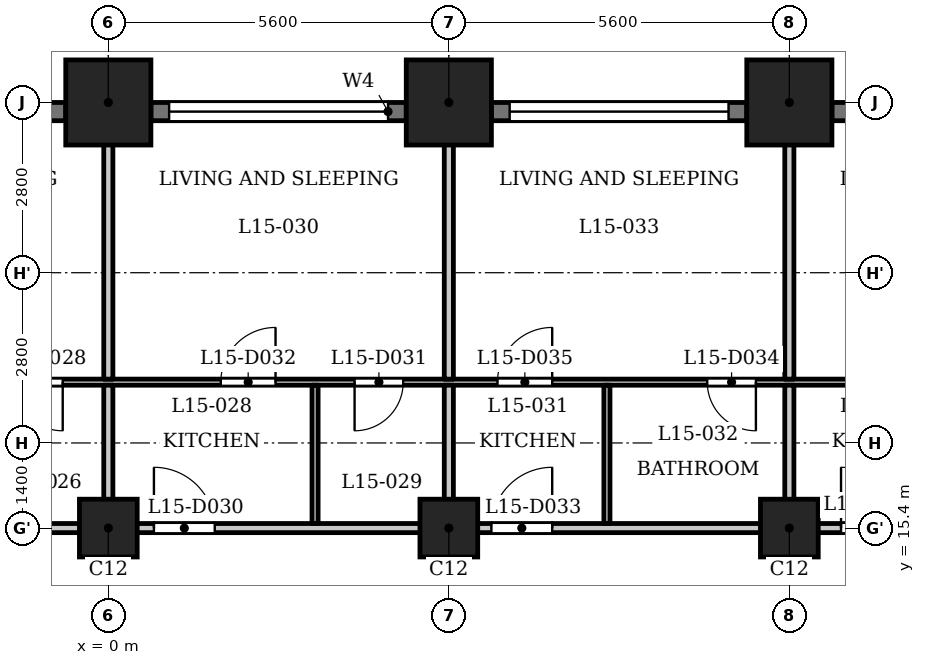
"""IFC4 building model, lengths in metres.
Left out: names, types, materials, properties, quantities, classifications, styles, units other than length and angle.
Written with IfcOpenShell. Run it as: python <this file> out.ifc"""

import sys

from ifc_helpers import new_model, si_unit, direction, frame, frame_2d, origin, origin_2d, place, context, subcontext, project, spatial, rectangle, extrude, element, fill, save


model = new_model("IFC4")
c1 = context("Model", 3, precision=1e-05, world=origin(), true_north=direction((0.0, 1.0)))
c2 = subcontext(c1, "Body", "Model", "MODEL_VIEW")
j1 = project(units=[si_unit("LENGTHUNIT", "METRE"), si_unit("PLANEANGLEUNIT", "RADIAN")], contexts=[c1])
p1 = place(None, origin())
s1 = spatial("IfcSite", under=j1, at=p1, CompositionType="ELEMENT")
p2 = place(p1, origin())
s2 = spatial("IfcBuilding", under=s1, at=p2, CompositionType="ELEMENT")
p3 = place(p2, frame((0.0, 0.0, 62.0)))
s3 = spatial("IfcBuildingStorey", under=s2, at=p3, CompositionType="ELEMENT", Elevation=62.0)
for number, where, z_axis, x_axis in (
    (1, (11.2, 22.4, 0.0), (0.0, 0.0, 1.0), (1.0, 0.0, 0.0)),
    (2, (5.6, 22.4, 0.0), (0.0, 0.0, 1.0), (1.0, 0.0, 0.0)),
    (3, (0.0, 22.4, 0.0), (0.0, 0.0, 1.0), (1.0, 0.0, 0.0)),
):
    element("IfcColumn", number, at=place(p3, frame(where, z_axis=z_axis, x_axis=x_axis)), inside=s3, PredefinedType="COLUMN", context=c2, shape_type="SweptSolid", body=[
        extrude(rectangle(XDim=1.4, YDim=1.4, at=origin_2d()), origin(), (0.0, 0.0, 1.0), 3.5),
    ])
for number, where, z_axis, x_axis in (
    (4, (0.0, 15.4, 0.0), (0.0, 0.0, 1.0), (1.0, 0.0, 0.0)),
    (5, (5.6, 15.4, 0.0), (0.0, 0.0, 1.0), (1.0, 0.0, 0.0)),
    (6, (11.2, 15.4, 0.0), (0.0, 0.0, 1.0), (1.0, 0.0, 0.0)),
):
    element("IfcColumn", number, at=place(p3, frame(where, z_axis=z_axis, x_axis=x_axis)), inside=s3, PredefinedType="COLUMN", context=c2, shape_type="SweptSolid", body=[
        extrude(rectangle(XDim=0.95, YDim=0.95, at=origin_2d()), origin(), (0.0, 0.0, 1.0), 3.5),
    ])
p4 = place(p3, frame((16.1, 22.25, 0.0), z_axis=(0.0, 0.0, 1.0), x_axis=(-1.0, 0.0, 0.0)))
e7 = element("IfcWall", 7, at=p4, inside=s3, PredefinedType="SOLIDWALL", context=c2, shape_type="SweptSolid", body=[
    extrude(rectangle(XDim=4.2, YDim=0.3, at=frame_2d((2.1, 0.0))), origin(), (0.0, 0.0, 1.0), 2.35),
])
p5 = place(p4, frame((0.3, 0.0, 1.2)))
e8 = element("IfcOpeningElement", 8, at=p5, cuts=e7, PredefinedType="OPENING", context=c2, shape_type="SweptSolid", body=[
    extrude(rectangle(XDim=3.6, YDim=0.95, at=frame_2d((1.8, 0.475))), frame((0.0, 0.16, 0.0), z_axis=(0.0, -1.0, 0.0), x_axis=(1.0, 0.0, 0.0)), (0.0, 0.0, 1.0), 0.32),
])
p6 = place(p3, frame((10.5, 22.25, 0.0), z_axis=(0.0, 0.0, 1.0), x_axis=(-1.0, 0.0, 0.0)))
e9 = element("IfcWall", 9, at=p6, inside=s3, PredefinedType="SOLIDWALL", context=c2, shape_type="SweptSolid", body=[
    extrude(rectangle(XDim=4.2, YDim=0.3, at=frame_2d((2.1, 0.0))), origin(), (0.0, 0.0, 1.0), 2.35),
])
p7 = place(p6, frame((0.3, 0.0, 1.2)))
e10 = element("IfcOpeningElement", 10, at=p7, cuts=e9, PredefinedType="OPENING", context=c2, shape_type="SweptSolid", body=[
    extrude(rectangle(XDim=3.6, YDim=0.95, at=frame_2d((1.8, 0.475))), frame((0.0, 0.16, 0.0), z_axis=(0.0, -1.0, 0.0), x_axis=(1.0, 0.0, 0.0)), (0.0, 0.0, 1.0), 0.32),
])
p8 = place(p3, frame((4.9, 22.25, 0.0), z_axis=(0.0, 0.0, 1.0), x_axis=(-1.0, 0.0, 0.0)))
e11 = element("IfcWall", 11, at=p8, inside=s3, PredefinedType="SOLIDWALL", context=c2, shape_type="SweptSolid", body=[
    extrude(rectangle(XDim=4.2, YDim=0.3, at=frame_2d((2.1, 0.0))), origin(), (0.0, 0.0, 1.0), 2.35),
])
p9 = place(p8, frame((0.3, 0.0, 1.2)))
e12 = element("IfcOpeningElement", 12, at=p9, cuts=e11, PredefinedType="OPENING", context=c2, shape_type="SweptSolid", body=[
    extrude(rectangle(XDim=3.6, YDim=0.95, at=frame_2d((1.8, 0.475))), frame((0.0, 0.16, 0.0), z_axis=(0.0, -1.0, 0.0), x_axis=(1.0, 0.0, 0.0)), (0.0, 0.0, 1.0), 0.32),
])
p10 = place(p3, frame((-0.7, 22.25, 0.0), z_axis=(0.0, 0.0, 1.0), x_axis=(-1.0, 0.0, 0.0)))
e13 = element("IfcWall", 13, at=p10, inside=s3, PredefinedType="SOLIDWALL", context=c2, shape_type="SweptSolid", body=[
    extrude(rectangle(XDim=4.2, YDim=0.3, at=frame_2d((2.1, 0.0))), origin(), (0.0, 0.0, 1.0), 2.35),
])
p11 = place(p10, frame((0.3, 0.0, 1.2)))
e14 = element("IfcOpeningElement", 14, at=p11, cuts=e13, PredefinedType="OPENING", context=c2, shape_type="SweptSolid", body=[
    extrude(rectangle(XDim=3.6, YDim=0.95, at=frame_2d((1.8, 0.475))), frame((0.0, 0.16, 0.0), z_axis=(0.0, -1.0, 0.0), x_axis=(1.0, 0.0, 0.0)), (0.0, 0.0, 1.0), 0.32),
])
p12 = place(p3, frame((-27.484, 15.4, 0.0), z_axis=(0.0, 0.0, 1.0), x_axis=(1.0, 0.0, 0.0)))
e15 = element("IfcWall", 15, at=p12, inside=s3, PredefinedType="PARTITIONING", context=c2, shape_type="SweptSolid", body=[
    extrude(rectangle(XDim=54.968, YDim=0.15, at=frame_2d((27.484, 0.0))), origin(), (0.0, 0.0, 1.0), 3.2),
])
p13 = place(p12, frame((8.784, 0.0, 0.0)))
e16 = element("IfcOpeningElement", 16, at=p13, cuts=e15, PredefinedType="OPENING", context=c2, shape_type="SweptSolid", body=[
    extrude(rectangle(XDim=1.0, YDim=2.1, at=frame_2d((0.5, 1.05))), frame((0.0, 0.085, 0.0), z_axis=(0.0, -1.0, 0.0), x_axis=(1.0, 0.0, 0.0)), (0.0, 0.0, 1.0), 0.17),
])
p14 = place(p12, frame((14.634, 0.0, 0.0)))
e17 = element("IfcOpeningElement", 17, at=p14, cuts=e15, PredefinedType="OPENING", context=c2, shape_type="SweptSolid", body=[
    extrude(rectangle(XDim=1.0, YDim=2.1, at=frame_2d((0.5, 1.05))), frame((0.0, 0.085, 0.0), z_axis=(0.0, -1.0, 0.0), x_axis=(1.0, 0.0, 0.0)), (0.0, 0.0, 1.0), 0.17),
])
p15 = place(p12, frame((19.484, 0.0, 0.0)))
e18 = element("IfcOpeningElement", 18, at=p15, cuts=e15, PredefinedType="OPENING", context=c2, shape_type="SweptSolid", body=[
    extrude(rectangle(XDim=1.0, YDim=2.1, at=frame_2d((0.5, 1.05))), frame((0.0, 0.085, 0.0), z_axis=(0.0, -1.0, 0.0), x_axis=(1.0, 0.0, 0.0)), (0.0, 0.0, 1.0), 0.17),
])
p16 = place(p12, frame((23.634, 0.0, 0.0)))
e19 = element("IfcOpeningElement", 19, at=p16, cuts=e15, PredefinedType="OPENING", context=c2, shape_type="SweptSolid", body=[
    extrude(rectangle(XDim=1.0, YDim=2.1, at=frame_2d((0.5, 1.05))), frame((0.0, 0.085, 0.0), z_axis=(0.0, -1.0, 0.0), x_axis=(1.0, 0.0, 0.0)), (0.0, 0.0, 1.0), 0.17),
])
p17 = place(p12, frame((28.234, 0.0, 0.0)))
e20 = element("IfcOpeningElement", 20, at=p17, cuts=e15, PredefinedType="OPENING", context=c2, shape_type="SweptSolid", body=[
    extrude(rectangle(XDim=1.0, YDim=2.1, at=frame_2d((0.5, 1.05))), frame((0.0, 0.085, 0.0), z_axis=(0.0, -1.0, 0.0), x_axis=(1.0, 0.0, 0.0)), (0.0, 0.0, 1.0), 0.17),
])
p18 = place(p12, frame((33.784, 0.0, 0.0)))
e21 = element("IfcOpeningElement", 21, at=p18, cuts=e15, PredefinedType="OPENING", context=c2, shape_type="SweptSolid", body=[
    extrude(rectangle(XDim=1.0, YDim=2.1, at=frame_2d((0.5, 1.05))), frame((0.0, 0.085, 0.0), z_axis=(0.0, -1.0, 0.0), x_axis=(1.0, 0.0, 0.0)), (0.0, 0.0, 1.0), 0.17),
])
p19 = place(p12, frame((39.534, 0.0, 0.0)))
e22 = element("IfcOpeningElement", 22, at=p19, cuts=e15, PredefinedType="OPENING", context=c2, shape_type="SweptSolid", body=[
    extrude(rectangle(XDim=1.0, YDim=2.1, at=frame_2d((0.5, 1.05))), frame((0.0, 0.085, 0.0), z_axis=(0.0, -1.0, 0.0), x_axis=(1.0, 0.0, 0.0)), (0.0, 0.0, 1.0), 0.17),
])
p20 = place(p12, frame((48.234, 0.0, 0.0)))
e23 = element("IfcOpeningElement", 23, at=p20, cuts=e15, PredefinedType="OPENING", context=c2, shape_type="SweptSolid", body=[
    extrude(rectangle(XDim=1.0, YDim=2.1, at=frame_2d((0.5, 1.05))), frame((0.0, 0.085, 0.0), z_axis=(0.0, -1.0, 0.0), x_axis=(1.0, 0.0, 0.0)), (0.0, 0.0, 1.0), 0.17),
])
p21 = place(p3, frame((-26.64, 17.8, 0.0), z_axis=(0.0, 0.0, 1.0), x_axis=(1.0, 0.0, 0.0)))
e24 = element("IfcWall", 24, at=p21, inside=s3, PredefinedType="PARTITIONING", context=c2, shape_type="SweptSolid", body=[
    extrude(rectangle(XDim=53.034, YDim=0.1, at=frame_2d((26.517, 0.0))), origin(), (0.0, 0.0, 1.0), 3.2),
])
p22 = place(p21, frame((2.872, 0.0, 0.0)))
e25 = element("IfcOpeningElement", 25, at=p22, cuts=e24, PredefinedType="OPENING", context=c2, shape_type="SweptSolid", body=[
    extrude(rectangle(XDim=0.8, YDim=2.1, at=frame_2d((0.4, 1.05))), frame((0.0, 0.06, 0.0), z_axis=(0.0, -1.0, 0.0), x_axis=(1.0, 0.0, 0.0)), (0.0, 0.0, 1.0), 0.12),
])
p23 = place(p21, frame((7.04, 0.0, 0.0)))
e26 = element("IfcOpeningElement", 26, at=p23, cuts=e24, PredefinedType="OPENING", context=c2, shape_type="SweptSolid", body=[
    extrude(rectangle(XDim=0.9, YDim=2.1, at=frame_2d((0.45, 1.05))), frame((0.0, 0.06, 0.0), z_axis=(0.0, -1.0, 0.0), x_axis=(1.0, 0.0, 0.0)), (0.0, 0.0, 1.0), 0.12),
])
p24 = place(p21, frame((10.74, 0.0, 0.0)))
e27 = element("IfcOpeningElement", 27, at=p24, cuts=e24, PredefinedType="OPENING", context=c2, shape_type="SweptSolid", body=[
    extrude(rectangle(XDim=0.8, YDim=2.1, at=frame_2d((0.4, 1.05))), frame((0.0, 0.06, 0.0), z_axis=(0.0, -1.0, 0.0), x_axis=(1.0, 0.0, 0.0)), (0.0, 0.0, 1.0), 0.12),
])
p25 = place(p21, frame((12.89, 0.0, 0.0)))
e28 = element("IfcOpeningElement", 28, at=p25, cuts=e24, PredefinedType="OPENING", context=c2, shape_type="SweptSolid", body=[
    extrude(rectangle(XDim=0.9, YDim=2.1, at=frame_2d((0.45, 1.05))), frame((0.0, 0.06, 0.0), z_axis=(0.0, -1.0, 0.0), x_axis=(1.0, 0.0, 0.0)), (0.0, 0.0, 1.0), 0.12),
])
p26 = place(p21, frame((16.34, 0.0, 0.0)))
e29 = element("IfcOpeningElement", 29, at=p26, cuts=e24, PredefinedType="OPENING", context=c2, shape_type="SweptSolid", body=[
    extrude(rectangle(XDim=0.8, YDim=2.1, at=frame_2d((0.4, 1.05))), frame((0.0, 0.06, 0.0), z_axis=(0.0, -1.0, 0.0), x_axis=(1.0, 0.0, 0.0)), (0.0, 0.0, 1.0), 0.12),
])
p27 = place(p21, frame((19.74, 0.0, 0.0)))
e30 = element("IfcOpeningElement", 30, at=p27, cuts=e24, PredefinedType="OPENING", context=c2, shape_type="SweptSolid", body=[
    extrude(rectangle(XDim=0.9, YDim=2.1, at=frame_2d((0.45, 1.05))), frame((0.0, 0.06, 0.0), z_axis=(0.0, -1.0, 0.0), x_axis=(1.0, 0.0, 0.0)), (0.0, 0.0, 1.0), 0.12),
])
p28 = place(p21, frame((25.09, 0.0, 0.0)))
e31 = element("IfcOpeningElement", 31, at=p28, cuts=e24, PredefinedType="OPENING", context=c2, shape_type="SweptSolid", body=[
    extrude(rectangle(XDim=0.8, YDim=2.1, at=frame_2d((0.4, 1.05))), frame((0.0, 0.06, 0.0), z_axis=(0.0, -1.0, 0.0), x_axis=(1.0, 0.0, 0.0)), (0.0, 0.0, 1.0), 0.12),
])
p29 = place(p21, frame((21.89, 0.0, 0.0)))
e32 = element("IfcOpeningElement", 32, at=p29, cuts=e24, PredefinedType="OPENING", context=c2, shape_type="SweptSolid", body=[
    extrude(rectangle(XDim=0.9, YDim=2.1, at=frame_2d((0.45, 1.05))), frame((0.0, 0.06, 0.0), z_axis=(0.0, -1.0, 0.0), x_axis=(1.0, 0.0, 0.0)), (0.0, 0.0, 1.0), 0.12),
])
p30 = place(p21, frame((30.69, 0.0, 0.0)))
e33 = element("IfcOpeningElement", 33, at=p30, cuts=e24, PredefinedType="OPENING", context=c2, shape_type="SweptSolid", body=[
    extrude(rectangle(XDim=0.8, YDim=2.1, at=frame_2d((0.4, 1.05))), frame((0.0, 0.06, 0.0), z_axis=(0.0, -1.0, 0.0), x_axis=(1.0, 0.0, 0.0)), (0.0, 0.0, 1.0), 0.12),
])
p31 = place(p21, frame((28.49, 0.0, 0.0)))
e34 = element("IfcOpeningElement", 34, at=p31, cuts=e24, PredefinedType="OPENING", context=c2, shape_type="SweptSolid", body=[
    extrude(rectangle(XDim=0.9, YDim=2.1, at=frame_2d((0.45, 1.05))), frame((0.0, 0.06, 0.0), z_axis=(0.0, -1.0, 0.0), x_axis=(1.0, 0.0, 0.0)), (0.0, 0.0, 1.0), 0.12),
])
p32 = place(p21, frame((36.49, 0.0, 0.0)))
e35 = element("IfcOpeningElement", 35, at=p32, cuts=e24, PredefinedType="OPENING", context=c2, shape_type="SweptSolid", body=[
    extrude(rectangle(XDim=0.8, YDim=2.1, at=frame_2d((0.4, 1.05))), frame((0.0, 0.06, 0.0), z_axis=(0.0, -1.0, 0.0), x_axis=(1.0, 0.0, 0.0)), (0.0, 0.0, 1.0), 0.12),
])
p33 = place(p21, frame((33.04, 0.0, 0.0)))
e36 = element("IfcOpeningElement", 36, at=p33, cuts=e24, PredefinedType="OPENING", context=c2, shape_type="SweptSolid", body=[
    extrude(rectangle(XDim=0.9, YDim=2.1, at=frame_2d((0.45, 1.05))), frame((0.0, 0.06, 0.0), z_axis=(0.0, -1.0, 0.0), x_axis=(1.0, 0.0, 0.0)), (0.0, 0.0, 1.0), 0.12),
])
p34 = place(p21, frame((41.49, 0.0, 0.0)))
e37 = element("IfcOpeningElement", 37, at=p34, cuts=e24, PredefinedType="OPENING", context=c2, shape_type="SweptSolid", body=[
    extrude(rectangle(XDim=0.8, YDim=2.1, at=frame_2d((0.4, 1.05))), frame((0.0, 0.06, 0.0), z_axis=(0.0, -1.0, 0.0), x_axis=(1.0, 0.0, 0.0)), (0.0, 0.0, 1.0), 0.12),
])
p35 = place(p21, frame((39.79, 0.0, 0.0)))
e38 = element("IfcOpeningElement", 38, at=p35, cuts=e24, PredefinedType="OPENING", context=c2, shape_type="SweptSolid", body=[
    extrude(rectangle(XDim=0.9, YDim=2.1, at=frame_2d((0.45, 1.05))), frame((0.0, 0.06, 0.0), z_axis=(0.0, -1.0, 0.0), x_axis=(1.0, 0.0, 0.0)), (0.0, 0.0, 1.0), 0.12),
])
p36 = place(p21, frame((51.44, 0.0, 0.0)))
e39 = element("IfcOpeningElement", 39, at=p36, cuts=e24, PredefinedType="OPENING", context=c2, shape_type="SweptSolid", body=[
    extrude(rectangle(XDim=0.8, YDim=2.1, at=frame_2d((0.4, 1.05))), frame((0.0, 0.06, 0.0), z_axis=(0.0, -1.0, 0.0), x_axis=(1.0, 0.0, 0.0)), (0.0, 0.0, 1.0), 0.12),
])
p37 = place(p21, frame((46.49, 0.0, 0.0)))
e40 = element("IfcOpeningElement", 40, at=p37, cuts=e24, PredefinedType="OPENING", context=c2, shape_type="SweptSolid", body=[
    extrude(rectangle(XDim=0.9, YDim=2.1, at=frame_2d((0.45, 1.05))), frame((0.0, 0.06, 0.0), z_axis=(0.0, -1.0, 0.0), x_axis=(1.0, 0.0, 0.0)), (0.0, 0.0, 1.0), 0.12),
])
p38 = place(p3, frame((0.0, 15.475, 0.0), z_axis=(0.0, 0.0, 1.0), x_axis=(0.0, 1.0, 0.0)))
e41 = element("IfcWall", 41, at=p38, inside=s3, PredefinedType="PARTITIONING", context=c2, shape_type="SweptSolid", body=[
    extrude(rectangle(XDim=2.275, YDim=0.15, at=frame_2d((1.137, 0.0))), origin(), (0.0, 0.0, 1.0), 3.2),
])
p39 = place(p3, frame((0.0, 17.85, 0.0), z_axis=(0.0, 0.0, 1.0), x_axis=(0.0, 1.0, 0.0)))
e42 = element("IfcWall", 42, at=p39, inside=s3, PredefinedType="PARTITIONING", context=c2, shape_type="SweptSolid", body=[
    extrude(rectangle(XDim=5.23, YDim=0.15, at=frame_2d((2.615, 0.0))), origin(), (0.0, 0.0, 1.0), 3.2),
])
p40 = place(p3, frame((3.4, 15.475, 0.0), z_axis=(0.0, 0.0, 1.0), x_axis=(0.0, 1.0, 0.0)))
e43 = element("IfcWall", 43, at=p40, inside=s3, PredefinedType="PARTITIONING", context=c2, shape_type="SweptSolid", body=[
    extrude(rectangle(XDim=2.275, YDim=0.1, at=frame_2d((1.137, 0.0))), origin(), (0.0, 0.0, 1.0), 3.2),
])
p41 = place(p3, frame((5.6, 15.475, 0.0), z_axis=(0.0, 0.0, 1.0), x_axis=(0.0, 1.0, 0.0)))
e44 = element("IfcWall", 44, at=p41, inside=s3, PredefinedType="PARTITIONING", context=c2, shape_type="SweptSolid", body=[
    extrude(rectangle(XDim=2.275, YDim=0.15, at=frame_2d((1.137, 0.0))), origin(), (0.0, 0.0, 1.0), 3.2),
])
p42 = place(p3, frame((5.6, 17.85, 0.0), z_axis=(0.0, 0.0, 1.0), x_axis=(0.0, 1.0, 0.0)))
e45 = element("IfcWall", 45, at=p42, inside=s3, PredefinedType="PARTITIONING", context=c2, shape_type="SweptSolid", body=[
    extrude(rectangle(XDim=5.23, YDim=0.15, at=frame_2d((2.615, 0.0))), origin(), (0.0, 0.0, 1.0), 3.2),
])
p43 = place(p3, frame((8.2, 15.475, 0.0), z_axis=(0.0, 0.0, 1.0), x_axis=(0.0, 1.0, 0.0)))
e46 = element("IfcWall", 46, at=p43, inside=s3, PredefinedType="PARTITIONING", context=c2, shape_type="SweptSolid", body=[
    extrude(rectangle(XDim=2.275, YDim=0.1, at=frame_2d((1.137, 0.0))), origin(), (0.0, 0.0, 1.0), 3.2),
])
p44 = place(p3, frame((11.2, 15.475, 0.0), z_axis=(0.0, 0.0, 1.0), x_axis=(0.0, 1.0, 0.0)))
e47 = element("IfcWall", 47, at=p44, inside=s3, PredefinedType="PARTITIONING", context=c2, shape_type="SweptSolid", body=[
    extrude(rectangle(XDim=2.275, YDim=0.15, at=frame_2d((1.137, 0.0))), origin(), (0.0, 0.0, 1.0), 3.2),
])
p45 = place(p3, frame((11.2, 17.85, 0.0), z_axis=(0.0, 0.0, 1.0), x_axis=(0.0, 1.0, 0.0)))
e48 = element("IfcWall", 48, at=p45, inside=s3, PredefinedType="PARTITIONING", context=c2, shape_type="SweptSolid", body=[
    extrude(rectangle(XDim=5.23, YDim=0.15, at=frame_2d((2.615, 0.0))), origin(), (0.0, 0.0, 1.0), 3.2),
])
p46 = place(p28, origin())
e49 = element("IfcDoor", 49, at=p46, inside=s3, OperationType="SINGLE_SWING_RIGHT", PredefinedType="DOOR", context=c2, shape_type="SweptSolid", body=[
    extrude(rectangle(XDim=0.8, YDim=2.1, at=frame_2d((0.4, 1.05))), frame((0.0, 0.025, 0.0), z_axis=(0.0, -1.0, 0.0), x_axis=(1.0, 0.0, 0.0)), (0.0, 0.0, 1.0), 0.05),
])
fill(e31, e49)
p47 = place(p17, origin())
e50 = element("IfcDoor", 50, at=p47, inside=s3, OperationType="SINGLE_SWING_RIGHT", PredefinedType="DOOR", context=c2, shape_type="SweptSolid", body=[
    extrude(rectangle(XDim=1.0, YDim=2.1, at=frame_2d((0.5, 1.05))), frame((0.0, 0.025, 0.0), z_axis=(0.0, -1.0, 0.0), x_axis=(1.0, 0.0, 0.0)), (0.0, 0.0, 1.0), 0.05),
])
fill(e20, e50)
p48 = place(p30, origin())
e51 = element("IfcDoor", 51, at=p48, inside=s3, OperationType="SINGLE_SWING_LEFT", PredefinedType="DOOR", context=c2, shape_type="SweptSolid", body=[
    extrude(rectangle(XDim=0.8, YDim=2.1, at=frame_2d((0.4, 1.05))), frame((0.0, 0.025, 0.0), z_axis=(0.0, -1.0, 0.0), x_axis=(1.0, 0.0, 0.0)), (0.0, 0.0, 1.0), 0.05),
])
fill(e33, e51)
p49 = place(p31, origin())
e52 = element("IfcDoor", 52, at=p49, inside=s3, OperationType="SINGLE_SWING_LEFT", PredefinedType="DOOR", context=c2, shape_type="SweptSolid", body=[
    extrude(rectangle(XDim=0.9, YDim=2.1, at=frame_2d((0.45, 1.05))), frame((0.0, 0.025, 0.0), z_axis=(0.0, -1.0, 0.0), x_axis=(1.0, 0.0, 0.0)), (0.0, 0.0, 1.0), 0.05),
])
fill(e34, e52)
p50 = place(p18, origin())
e53 = element("IfcDoor", 53, at=p50, inside=s3, OperationType="SINGLE_SWING_LEFT", PredefinedType="DOOR", context=c2, shape_type="SweptSolid", body=[
    extrude(rectangle(XDim=1.0, YDim=2.1, at=frame_2d((0.5, 1.05))), frame((0.0, 0.025, 0.0), z_axis=(0.0, -1.0, 0.0), x_axis=(1.0, 0.0, 0.0)), (0.0, 0.0, 1.0), 0.05),
])
fill(e21, e53)
p51 = place(p32, origin())
e54 = element("IfcDoor", 54, at=p51, inside=s3, OperationType="SINGLE_SWING_RIGHT", PredefinedType="DOOR", context=c2, shape_type="SweptSolid", body=[
    extrude(rectangle(XDim=0.8, YDim=2.1, at=frame_2d((0.4, 1.05))), frame((0.0, 0.025, 0.0), z_axis=(0.0, -1.0, 0.0), x_axis=(1.0, 0.0, 0.0)), (0.0, 0.0, 1.0), 0.05),
])
fill(e35, e54)
p52 = place(p33, origin())
e55 = element("IfcDoor", 55, at=p52, inside=s3, OperationType="SINGLE_SWING_LEFT", PredefinedType="DOOR", context=c2, shape_type="SweptSolid", body=[
    extrude(rectangle(XDim=0.9, YDim=2.1, at=frame_2d((0.45, 1.05))), frame((0.0, 0.025, 0.0), z_axis=(0.0, -1.0, 0.0), x_axis=(1.0, 0.0, 0.0)), (0.0, 0.0, 1.0), 0.05),
])
fill(e36, e55)
p53 = place(p19, origin())
e56 = element("IfcDoor", 56, at=p53, inside=s3, OperationType="SINGLE_SWING_RIGHT", PredefinedType="DOOR", context=c2, shape_type="SweptSolid", body=[
    extrude(rectangle(XDim=1.0, YDim=2.1, at=frame_2d((0.5, 1.05))), frame((0.0, 0.025, 0.0), z_axis=(0.0, -1.0, 0.0), x_axis=(1.0, 0.0, 0.0)), (0.0, 0.0, 1.0), 0.05),
])
fill(e22, e56)
p54 = place(p7, origin())
e57 = element("IfcWindow", 57, at=p54, inside=s3, PartitioningType="SINGLE_PANEL", PredefinedType="WINDOW", context=c2, shape_type="SweptSolid", body=[
    extrude(rectangle(XDim=3.6, YDim=0.95, at=frame_2d((1.8, 0.475))), frame((0.0, 0.03, 0.0), z_axis=(0.0, -1.0, 0.0), x_axis=(1.0, 0.0, 0.0)), (0.0, 0.0, 1.0), 0.06),
])
fill(e10, e57)
p55 = place(p9, origin())
e58 = element("IfcWindow", 58, at=p55, inside=s3, PartitioningType="SINGLE_PANEL", PredefinedType="WINDOW", context=c2, shape_type="SweptSolid", body=[
    extrude(rectangle(XDim=3.6, YDim=0.95, at=frame_2d((1.8, 0.475))), frame((0.0, 0.03, 0.0), z_axis=(0.0, -1.0, 0.0), x_axis=(1.0, 0.0, 0.0)), (0.0, 0.0, 1.0), 0.06),
])
fill(e12, e58)
save(model, sys.argv[1])
